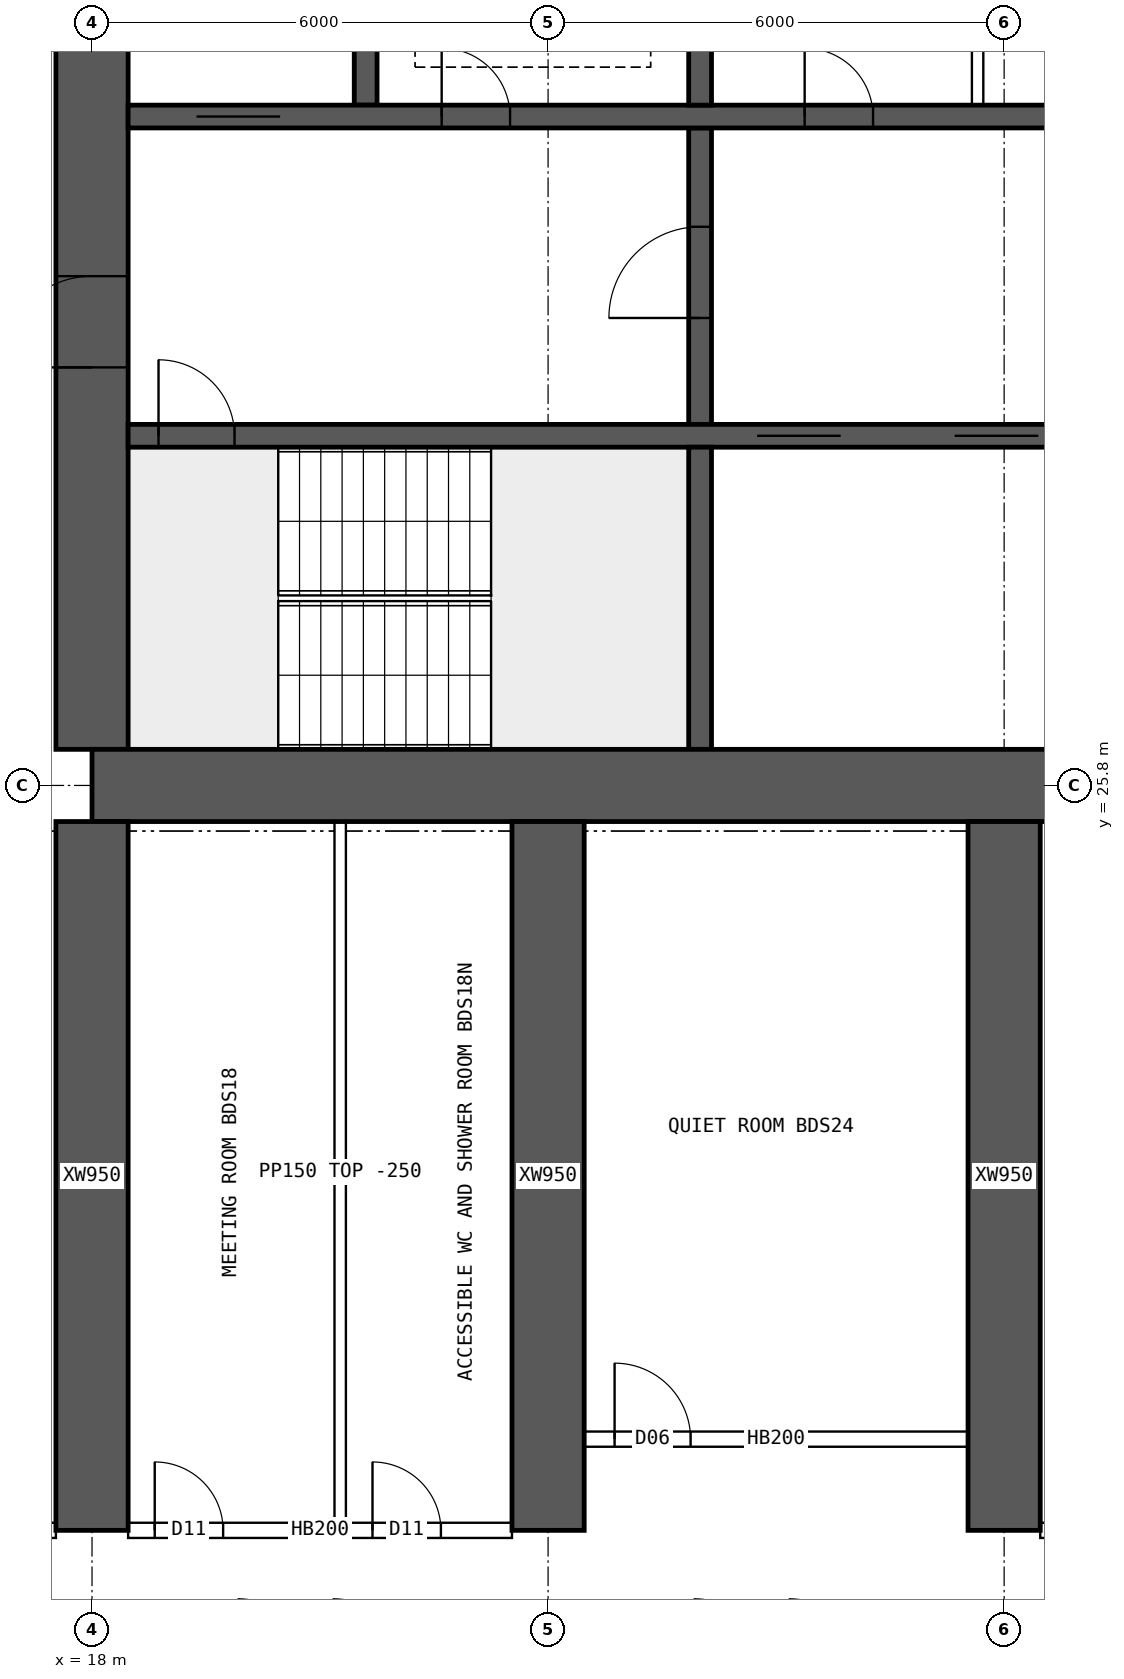
"""IFC4 building model, lengths in metres.
Left out: names, types, materials, properties, quantities, classifications, styles, units other than length and angle.
Written with IfcOpenShell. Run it as: python <this file> out.ifc"""

import sys

from ifc_helpers import new_model, si_unit, direction, frame, frame_2d, origin, place, context, subcontext, project, spatial, rectangle, extrude, element, fill, save


model = new_model("IFC4")
c1 = context("Model", 3, precision=1e-05, world=origin(), true_north=direction((0.0, 1.0)))
c2 = subcontext(c1, "Body", "Model", "MODEL_VIEW")
j1 = project(units=[si_unit("LENGTHUNIT", "METRE"), si_unit("PLANEANGLEUNIT", "RADIAN")], contexts=[c1])
p1 = place(None, origin())
s1 = spatial("IfcSite", under=j1, at=p1, CompositionType="ELEMENT")
p2 = place(p1, origin())
s2 = spatial("IfcBuilding", under=s1, at=p2, CompositionType="ELEMENT")
p3 = place(p2, frame((0.0, 0.0, 88.15)))
s3 = spatial("IfcBuildingStorey", under=s2, at=p3, CompositionType="ELEMENT", Elevation=88.15)
p4 = place(p3, frame((18.0, 25.8, 0.0), z_axis=(0.0, 0.0, 1.0), x_axis=(1.0, 0.0, 0.0)))
e1 = element("IfcWall", 1, at=p4, inside=s3, PredefinedType="SHEAR", context=c2, shape_type="SweptSolid", body=[
    extrude(rectangle(XDim=48.0, YDim=0.95, at=frame_2d((24.0, 0.0))), origin(), (0.0, 0.0, 1.0), 3.75),
])
p5 = place(p3, frame((18.0, 26.275, 0.0), z_axis=(0.0, 0.0, 1.0), x_axis=(0.0, 1.0, 0.0)))
e2 = element("IfcWall", 2, at=p5, inside=s3, PredefinedType="SHEAR", context=c2, shape_type="SweptSolid", body=[
    extrude(rectangle(XDim=11.45, YDim=0.95, at=frame_2d((5.725, 0.0))), origin(), (0.0, 0.0, 1.0), 3.75),
])
p6 = place(p5, frame((5.025, 0.0, 0.0)))
e3 = element("IfcOpeningElement", 3, at=p6, cuts=e2, PredefinedType="OPENING", context=c2, shape_type="SweptSolid", body=[
    extrude(rectangle(XDim=1.2, YDim=2.1, at=frame_2d((0.6, 1.05))), frame((0.0, 0.485, 0.0), z_axis=(0.0, -1.0, 0.0), x_axis=(1.0, 0.0, 0.0)), (0.0, 0.0, 1.0), 0.97),
])
p7 = place(p3, frame((18.475, 30.4, 0.0), z_axis=(0.0, 0.0, 1.0), x_axis=(1.0, 0.0, 0.0)))
e4 = element("IfcWall", 4, at=p7, inside=s3, PredefinedType="SHEAR", context=c2, shape_type="SweptSolid", body=[
    extrude(rectangle(XDim=47.05, YDim=0.3, at=frame_2d((23.525, 0.0))), origin(), (0.0, 0.0, 1.0), 3.75),
])
p8 = place(p7, frame((0.4, 0.0, 0.0)))
e5 = element("IfcOpeningElement", 5, at=p8, cuts=e4, PredefinedType="OPENING", context=c2, shape_type="SweptSolid", body=[
    extrude(rectangle(XDim=1.0, YDim=2.1, at=frame_2d((0.5, 1.05))), frame((0.0, 0.16, 0.0), z_axis=(0.0, -1.0, 0.0), x_axis=(1.0, 0.0, 0.0)), (0.0, 0.0, 1.0), 0.32),
])
p9 = place(p7, frame((45.65, 0.0, 0.0)))
e6 = element("IfcOpeningElement", 6, at=p9, cuts=e4, PredefinedType="OPENING", context=c2, shape_type="SweptSolid", body=[
    extrude(rectangle(XDim=1.0, YDim=2.1, at=frame_2d((0.5, 1.05))), frame((0.0, 0.16, 0.0), z_axis=(0.0, -1.0, 0.0), x_axis=(1.0, 0.0, 0.0)), (0.0, 0.0, 1.0), 0.32),
])
p10 = place(p7, frame((8.275, 0.0, 0.0)))
e7 = element("IfcOpeningElement", 7, at=p10, cuts=e4, PredefinedType="OPENING", context=c2, shape_type="SweptSolid", body=[
    extrude(rectangle(XDim=1.1, YDim=2.1, at=frame_2d((0.55, 1.05))), frame((0.0, 0.16, 0.0), z_axis=(0.0, -1.0, 0.0), x_axis=(1.0, 0.0, 0.0)), (0.0, 0.0, 1.0), 0.32),
])
p11 = place(p7, frame((10.875, 0.0, 0.0)))
e8 = element("IfcOpeningElement", 8, at=p11, cuts=e4, PredefinedType="OPENING", context=c2, shape_type="SweptSolid", body=[
    extrude(rectangle(XDim=1.1, YDim=2.1, at=frame_2d((0.55, 1.05))), frame((0.0, 0.16, 0.0), z_axis=(0.0, -1.0, 0.0), x_axis=(1.0, 0.0, 0.0)), (0.0, 0.0, 1.0), 0.32),
])
p12 = place(p7, frame((13.475, 0.0, 0.0)))
e9 = element("IfcOpeningElement", 9, at=p12, cuts=e4, PredefinedType="OPENING", context=c2, shape_type="SweptSolid", body=[
    extrude(rectangle(XDim=1.1, YDim=2.1, at=frame_2d((0.55, 1.05))), frame((0.0, 0.16, 0.0), z_axis=(0.0, -1.0, 0.0), x_axis=(1.0, 0.0, 0.0)), (0.0, 0.0, 1.0), 0.32),
])
p13 = place(p7, frame((16.075, 0.0, 0.0)))
e10 = element("IfcOpeningElement", 10, at=p13, cuts=e4, PredefinedType="OPENING", context=c2, shape_type="SweptSolid", body=[
    extrude(rectangle(XDim=1.1, YDim=2.1, at=frame_2d((0.55, 1.05))), frame((0.0, 0.16, 0.0), z_axis=(0.0, -1.0, 0.0), x_axis=(1.0, 0.0, 0.0)), (0.0, 0.0, 1.0), 0.32),
])
p14 = place(p7, frame((18.85, 0.0, 0.0)))
e11 = element("IfcOpeningElement", 11, at=p14, cuts=e4, PredefinedType="OPENING", context=c2, shape_type="SweptSolid", body=[
    extrude(rectangle(XDim=0.9, YDim=2.1, at=frame_2d((0.45, 1.05))), frame((0.0, 0.16, 0.0), z_axis=(0.0, -1.0, 0.0), x_axis=(1.0, 0.0, 0.0)), (0.0, 0.0, 1.0), 0.32),
])
p15 = place(p7, frame((30.142, 0.0, 0.0)))
e12 = element("IfcOpeningElement", 12, at=p15, cuts=e4, PredefinedType="OPENING", context=c2, shape_type="SweptSolid", body=[
    extrude(rectangle(XDim=1.1, YDim=2.1, at=frame_2d((0.55, 1.05))), frame((0.0, 0.16, 0.0), z_axis=(0.0, -1.0, 0.0), x_axis=(1.0, 0.0, 0.0)), (0.0, 0.0, 1.0), 0.32),
])
p16 = place(p7, frame((33.675, 0.0, 0.0)))
e13 = element("IfcOpeningElement", 13, at=p16, cuts=e4, PredefinedType="OPENING", context=c2, shape_type="SweptSolid", body=[
    extrude(rectangle(XDim=1.1, YDim=2.1, at=frame_2d((0.55, 1.05))), frame((0.0, 0.16, 0.0), z_axis=(0.0, -1.0, 0.0), x_axis=(1.0, 0.0, 0.0)), (0.0, 0.0, 1.0), 0.32),
])
p17 = place(p7, frame((37.208, 0.0, 0.0)))
e14 = element("IfcOpeningElement", 14, at=p17, cuts=e4, PredefinedType="OPENING", context=c2, shape_type="SweptSolid", body=[
    extrude(rectangle(XDim=1.1, YDim=2.1, at=frame_2d((0.55, 1.05))), frame((0.0, 0.16, 0.0), z_axis=(0.0, -1.0, 0.0), x_axis=(1.0, 0.0, 0.0)), (0.0, 0.0, 1.0), 0.32),
])
p18 = place(p3, frame((18.475, 34.6, 0.0), z_axis=(0.0, 0.0, 1.0), x_axis=(1.0, 0.0, 0.0)))
e15 = element("IfcWall", 15, at=p18, inside=s3, PredefinedType="SHEAR", context=c2, shape_type="SweptSolid", body=[
    extrude(rectangle(XDim=47.05, YDim=0.3, at=frame_2d((23.525, 0.0))), origin(), (0.0, 0.0, 1.0), 3.75),
])
p19 = place(p18, frame((0.9, 0.0, 0.0)))
e16 = element("IfcOpeningElement", 16, at=p19, cuts=e15, PredefinedType="OPENING", context=c2, shape_type="SweptSolid", body=[
    extrude(rectangle(XDim=1.1, YDim=2.1, at=frame_2d((0.55, 1.05))), frame((0.0, 0.16, 0.0), z_axis=(0.0, -1.0, 0.0), x_axis=(1.0, 0.0, 0.0)), (0.0, 0.0, 1.0), 0.32),
])
p20 = place(p18, frame((45.05, 0.0, 0.0)))
e17 = element("IfcOpeningElement", 17, at=p20, cuts=e15, PredefinedType="OPENING", context=c2, shape_type="SweptSolid", body=[
    extrude(rectangle(XDim=1.1, YDim=2.1, at=frame_2d((0.55, 1.05))), frame((0.0, 0.16, 0.0), z_axis=(0.0, -1.0, 0.0), x_axis=(1.0, 0.0, 0.0)), (0.0, 0.0, 1.0), 0.32),
])
p21 = place(p18, frame((4.125, 0.0, 0.0)))
e18 = element("IfcOpeningElement", 18, at=p21, cuts=e15, PredefinedType="OPENING", context=c2, shape_type="SweptSolid", body=[
    extrude(rectangle(XDim=0.9, YDim=2.1, at=frame_2d((0.45, 1.05))), frame((0.0, 0.16, 0.0), z_axis=(0.0, -1.0, 0.0), x_axis=(1.0, 0.0, 0.0)), (0.0, 0.0, 1.0), 0.32),
])
p22 = place(p18, frame((42.025, 0.0, 0.0)))
e19 = element("IfcOpeningElement", 19, at=p22, cuts=e15, PredefinedType="OPENING", context=c2, shape_type="SweptSolid", body=[
    extrude(rectangle(XDim=0.9, YDim=2.1, at=frame_2d((0.45, 1.05))), frame((0.0, 0.16, 0.0), z_axis=(0.0, -1.0, 0.0), x_axis=(1.0, 0.0, 0.0)), (0.0, 0.0, 1.0), 0.32),
])
p23 = place(p18, frame((8.9, 0.0, 0.0)))
e20 = element("IfcOpeningElement", 20, at=p23, cuts=e15, PredefinedType="OPENING", context=c2, shape_type="SweptSolid", body=[
    extrude(rectangle(XDim=0.9, YDim=2.1, at=frame_2d((0.45, 1.05))), frame((0.0, 0.16, 0.0), z_axis=(0.0, -1.0, 0.0), x_axis=(1.0, 0.0, 0.0)), (0.0, 0.0, 1.0), 0.32),
])
p24 = place(p18, frame((12.874, 0.0, 0.0)))
e21 = element("IfcOpeningElement", 21, at=p24, cuts=e15, PredefinedType="OPENING", context=c2, shape_type="SweptSolid", body=[
    extrude(rectangle(XDim=0.9, YDim=2.1, at=frame_2d((0.45, 1.05))), frame((0.0, 0.16, 0.0), z_axis=(0.0, -1.0, 0.0), x_axis=(1.0, 0.0, 0.0)), (0.0, 0.0, 1.0), 0.32),
])
p25 = place(p18, frame((16.521, 0.0, 0.0)))
e22 = element("IfcOpeningElement", 22, at=p25, cuts=e15, PredefinedType="OPENING", context=c2, shape_type="SweptSolid", body=[
    extrude(rectangle(XDim=0.9, YDim=2.1, at=frame_2d((0.45, 1.05))), frame((0.0, 0.16, 0.0), z_axis=(0.0, -1.0, 0.0), x_axis=(1.0, 0.0, 0.0)), (0.0, 0.0, 1.0), 0.32),
])
p26 = place(p18, frame((20.28, 0.0, 0.0)))
e23 = element("IfcOpeningElement", 23, at=p26, cuts=e15, PredefinedType="OPENING", context=c2, shape_type="SweptSolid", body=[
    extrude(rectangle(XDim=0.9, YDim=2.1, at=frame_2d((0.45, 1.05))), frame((0.0, 0.16, 0.0), z_axis=(0.0, -1.0, 0.0), x_axis=(1.0, 0.0, 0.0)), (0.0, 0.0, 1.0), 0.32),
])
p27 = place(p18, frame((24.686, 0.0, 0.0)))
e24 = element("IfcOpeningElement", 24, at=p27, cuts=e15, PredefinedType="OPENING", context=c2, shape_type="SweptSolid", body=[
    extrude(rectangle(XDim=0.9, YDim=2.1, at=frame_2d((0.45, 1.05))), frame((0.0, 0.16, 0.0), z_axis=(0.0, -1.0, 0.0), x_axis=(1.0, 0.0, 0.0)), (0.0, 0.0, 1.0), 0.32),
])
p28 = place(p18, frame((27.483, 0.0, 0.0)))
e25 = element("IfcOpeningElement", 25, at=p28, cuts=e15, PredefinedType="OPENING", context=c2, shape_type="SweptSolid", body=[
    extrude(rectangle(XDim=0.9, YDim=2.1, at=frame_2d((0.45, 1.05))), frame((0.0, 0.16, 0.0), z_axis=(0.0, -1.0, 0.0), x_axis=(1.0, 0.0, 0.0)), (0.0, 0.0, 1.0), 0.32),
])
p29 = place(p18, frame((33.604, 0.0, 0.0)))
e26 = element("IfcOpeningElement", 26, at=p29, cuts=e15, PredefinedType="OPENING", context=c2, shape_type="SweptSolid", body=[
    extrude(rectangle(XDim=0.9, YDim=2.1, at=frame_2d((0.45, 1.05))), frame((0.0, 0.16, 0.0), z_axis=(0.0, -1.0, 0.0), x_axis=(1.0, 0.0, 0.0)), (0.0, 0.0, 1.0), 0.32),
])
p30 = place(p3, frame((26.0, 26.275, 0.0), z_axis=(0.0, 0.0, 1.0), x_axis=(0.0, 1.0, 0.0)))
e27 = element("IfcWall", 27, at=p30, inside=s3, PredefinedType="SHEAR", context=c2, shape_type="SweptSolid", body=[
    extrude(rectangle(XDim=3.975, YDim=0.3, at=frame_2d((1.988, 0.0))), origin(), (0.0, 0.0, 1.0), 3.75),
])
p31 = place(p3, frame((26.0, 30.55, 0.0), z_axis=(0.0, 0.0, 1.0), x_axis=(0.0, 1.0, 0.0)))
e28 = element("IfcWall", 28, at=p31, inside=s3, PredefinedType="SHEAR", context=c2, shape_type="SweptSolid", body=[
    extrude(rectangle(XDim=3.9, YDim=0.3, at=frame_2d((1.95, 0.0))), origin(), (0.0, 0.0, 1.0), 3.75),
])
p32 = place(p31, frame((1.4, 0.0, 0.0)))
e29 = element("IfcOpeningElement", 29, at=p32, cuts=e28, PredefinedType="OPENING", context=c2, shape_type="SweptSolid", body=[
    extrude(rectangle(XDim=1.2, YDim=2.1, at=frame_2d((0.6, 1.05))), frame((0.0, 0.16, 0.0), z_axis=(0.0, -1.0, 0.0), x_axis=(1.0, 0.0, 0.0)), (0.0, 0.0, 1.0), 0.32),
])
for number, where, z_axis, x_axis in (
    (30, (21.6, 34.75, 0.0), (0.0, 0.0, 1.0), (0.0, 1.0, 0.0)),
    (31, (26.0, 34.75, 0.0), (0.0, 0.0, 1.0), (0.0, 1.0, 0.0)),
):
    element("IfcWall", number, at=place(p3, frame(where, z_axis=z_axis, x_axis=x_axis)), inside=s3, PredefinedType="SHEAR", context=c2, shape_type="SweptSolid", body=[
        extrude(rectangle(XDim=2.975, YDim=0.3, at=frame_2d((1.488, 0.0))), origin(), (0.0, 0.0, 1.0), 3.75),
    ])
for number, where, z_axis, x_axis in (
    (32, (18.0, 16.0, 0.0), (0.0, 0.0, 1.0), (0.0, 1.0, 0.0)),
    (33, (24.0, 16.0, 0.0), (0.0, 0.0, 1.0), (0.0, 1.0, 0.0)),
    (34, (30.0, 16.0, 0.0), (0.0, 0.0, 1.0), (0.0, 1.0, 0.0)),
):
    element("IfcWall", number, at=place(p3, frame(where, z_axis=z_axis, x_axis=x_axis)), inside=s3, PredefinedType="SHEAR", context=c2, shape_type="SweptSolid", body=[
        extrude(rectangle(XDim=9.325, YDim=0.95, at=frame_2d((4.663, 0.0))), origin(), (0.0, 0.0, 1.0), 3.75),
    ])
p33 = place(p3, frame((29.651, 34.75, 0.0), z_axis=(0.0, 0.0, 1.0), x_axis=(0.0, 1.0, 0.0)))
e35 = element("IfcWall", 35, at=p33, inside=s3, PredefinedType="SOLIDWALL", context=c2, shape_type="SweptSolid", body=[
    extrude(rectangle(XDim=2.975, YDim=0.15, at=frame_2d((1.488, 0.0))), origin(), (0.0, 0.0, 1.0), 3.5),
])
p34 = place(p3, frame((12.475, 16.0, 0.0), z_axis=(0.0, 0.0, 1.0), x_axis=(1.0, 0.0, 0.0)))
e36 = element("IfcWall", 36, at=p34, inside=s3, PredefinedType="SOLIDWALL", context=c2, shape_type="SweptSolid", body=[
    extrude(rectangle(XDim=5.05, YDim=0.2, at=frame_2d((2.525, 0.0))), origin(), (0.0, 0.0, 1.0), 3.5),
])
p35 = place(p34, frame((3.325, 0.0, 0.0)))
e37 = element("IfcOpeningElement", 37, at=p35, cuts=e36, PredefinedType="OPENING", context=c2, shape_type="SweptSolid", body=[
    extrude(rectangle(XDim=1.6, YDim=2.1, at=frame_2d((0.8, 1.05))), frame((0.0, 0.11, 0.0), z_axis=(0.0, -1.0, 0.0), x_axis=(1.0, 0.0, 0.0)), (0.0, 0.0, 1.0), 0.22),
])
p36 = place(p3, frame((18.475, 16.0, 0.0), z_axis=(0.0, 0.0, 1.0), x_axis=(1.0, 0.0, 0.0)))
e38 = element("IfcWall", 38, at=p36, inside=s3, PredefinedType="SOLIDWALL", context=c2, shape_type="SweptSolid", body=[
    extrude(rectangle(XDim=5.05, YDim=0.2, at=frame_2d((2.525, 0.0))), origin(), (0.0, 0.0, 1.0), 3.5),
])
p37 = place(p36, frame((0.35, 0.0, 0.0)))
e39 = element("IfcOpeningElement", 39, at=p37, cuts=e38, PredefinedType="OPENING", context=c2, shape_type="SweptSolid", body=[
    extrude(rectangle(XDim=0.9, YDim=2.1, at=frame_2d((0.45, 1.05))), frame((0.0, 0.11, 0.0), z_axis=(0.0, -1.0, 0.0), x_axis=(1.0, 0.0, 0.0)), (0.0, 0.0, 1.0), 0.22),
])
p38 = place(p36, frame((3.215, 0.0, 0.0)))
e40 = element("IfcOpeningElement", 40, at=p38, cuts=e38, PredefinedType="OPENING", context=c2, shape_type="SweptSolid", body=[
    extrude(rectangle(XDim=0.9, YDim=2.1, at=frame_2d((0.45, 1.05))), frame((0.0, 0.11, 0.0), z_axis=(0.0, -1.0, 0.0), x_axis=(1.0, 0.0, 0.0)), (0.0, 0.0, 1.0), 0.22),
])
p39 = place(p3, frame((30.475, 16.0, 0.0), z_axis=(0.0, 0.0, 1.0), x_axis=(1.0, 0.0, 0.0)))
e41 = element("IfcWall", 41, at=p39, inside=s3, PredefinedType="SOLIDWALL", context=c2, shape_type="SweptSolid", body=[
    extrude(rectangle(XDim=5.05, YDim=0.2, at=frame_2d((2.525, 0.0))), origin(), (0.0, 0.0, 1.0), 3.5),
])
p40 = place(p39, frame((0.35, 0.0, 0.0)))
e42 = element("IfcOpeningElement", 42, at=p40, cuts=e41, PredefinedType="OPENING", context=c2, shape_type="SweptSolid", body=[
    extrude(rectangle(XDim=0.9, YDim=2.1, at=frame_2d((0.45, 1.05))), frame((0.0, 0.11, 0.0), z_axis=(0.0, -1.0, 0.0), x_axis=(1.0, 0.0, 0.0)), (0.0, 0.0, 1.0), 0.22),
])
p41 = place(p39, frame((2.535, 0.0, 0.0)))
e43 = element("IfcOpeningElement", 43, at=p41, cuts=e41, PredefinedType="OPENING", context=c2, shape_type="SweptSolid", body=[
    extrude(rectangle(XDim=0.9, YDim=2.1, at=frame_2d((0.45, 1.05))), frame((0.0, 0.11, 0.0), z_axis=(0.0, -1.0, 0.0), x_axis=(1.0, 0.0, 0.0)), (0.0, 0.0, 1.0), 0.22),
])
p42 = place(p3, frame((21.265, 16.1, 0.0), z_axis=(0.0, 0.0, 1.0), x_axis=(0.0, 1.0, 0.0)))
e44 = element("IfcWall", 44, at=p42, inside=s3, PredefinedType="PARTITIONING", context=c2, shape_type="SweptSolid", body=[
    extrude(rectangle(XDim=9.225, YDim=0.15, at=frame_2d((4.612, 0.0))), origin(), (0.0, 0.0, 1.0), 3.5),
])
p43 = place(p3, frame((24.475, 17.2, 0.0), z_axis=(0.0, 0.0, 1.0), x_axis=(1.0, 0.0, 0.0)))
e45 = element("IfcWall", 45, at=p43, inside=s3, PredefinedType="SOLIDWALL", context=c2, shape_type="SweptSolid", body=[
    extrude(rectangle(XDim=5.05, YDim=0.2, at=frame_2d((2.525, 0.0))), origin(), (0.0, 0.0, 1.0), 3.5),
])
p44 = place(p43, frame((0.4, 0.0, 0.0)))
e46 = element("IfcOpeningElement", 46, at=p44, cuts=e45, PredefinedType="OPENING", context=c2, shape_type="SweptSolid", body=[
    extrude(rectangle(XDim=1.0, YDim=2.1, at=frame_2d((0.5, 1.05))), frame((0.0, 0.11, 0.0), z_axis=(0.0, -1.0, 0.0), x_axis=(1.0, 0.0, 0.0)), (0.0, 0.0, 1.0), 0.22),
])
p45 = place(p6, origin())
e47 = element("IfcDoor", 47, at=p45, inside=s3, OperationType="SINGLE_SWING_LEFT", PredefinedType="DOOR", context=c2, shape_type="SweptSolid", body=[
    extrude(rectangle(XDim=1.2, YDim=2.1, at=frame_2d((0.6, 1.05))), frame((0.0, 0.025, 0.0), z_axis=(0.0, -1.0, 0.0), x_axis=(1.0, 0.0, 0.0)), (0.0, 0.0, 1.0), 0.05),
])
fill(e3, e47)
p46 = place(p8, origin())
e48 = element("IfcDoor", 48, at=p46, inside=s3, OperationType="SINGLE_SWING_LEFT", PredefinedType="DOOR", context=c2, shape_type="SweptSolid", body=[
    extrude(rectangle(XDim=1.0, YDim=2.1, at=frame_2d((0.5, 1.05))), frame((0.0, 0.025, 0.0), z_axis=(0.0, -1.0, 0.0), x_axis=(1.0, 0.0, 0.0)), (0.0, 0.0, 1.0), 0.05),
])
fill(e5, e48)
p47 = place(p19, origin())
e49 = element("IfcDoor", 49, at=p47, inside=s3, OperationType="DOUBLE_DOOR_SLIDING", PredefinedType="DOOR", context=c2, shape_type="SweptSolid", body=[
    extrude(rectangle(XDim=1.1, YDim=2.1, at=frame_2d((0.55, 1.05))), frame((0.0, 0.025, 0.0), z_axis=(0.0, -1.0, 0.0), x_axis=(1.0, 0.0, 0.0)), (0.0, 0.0, 1.0), 0.05),
])
fill(e16, e49)
p48 = place(p21, origin())
e50 = element("IfcDoor", 50, at=p48, inside=s3, OperationType="SINGLE_SWING_LEFT", PredefinedType="DOOR", context=c2, shape_type="SweptSolid", body=[
    extrude(rectangle(XDim=0.9, YDim=2.1, at=frame_2d((0.45, 1.05))), frame((0.0, 0.025, 0.0), z_axis=(0.0, -1.0, 0.0), x_axis=(1.0, 0.0, 0.0)), (0.0, 0.0, 1.0), 0.05),
])
fill(e18, e50)
p49 = place(p32, origin())
e51 = element("IfcDoor", 51, at=p49, inside=s3, OperationType="SINGLE_SWING_LEFT", PredefinedType="DOOR", context=c2, shape_type="SweptSolid", body=[
    extrude(rectangle(XDim=1.2, YDim=2.1, at=frame_2d((0.6, 1.05))), frame((0.0, 0.025, 0.0), z_axis=(0.0, -1.0, 0.0), x_axis=(1.0, 0.0, 0.0)), (0.0, 0.0, 1.0), 0.05),
])
fill(e29, e51)
p50 = place(p23, origin())
e52 = element("IfcDoor", 52, at=p50, inside=s3, OperationType="SINGLE_SWING_LEFT", PredefinedType="DOOR", context=c2, shape_type="SweptSolid", body=[
    extrude(rectangle(XDim=0.9, YDim=2.1, at=frame_2d((0.45, 1.05))), frame((0.0, 0.025, 0.0), z_axis=(0.0, -1.0, 0.0), x_axis=(1.0, 0.0, 0.0)), (0.0, 0.0, 1.0), 0.05),
])
fill(e20, e52)
p51 = place(p10, origin())
e53 = element("IfcDoor", 53, at=p51, inside=s3, OperationType="DOUBLE_DOOR_SLIDING", PredefinedType="DOOR", context=c2, shape_type="SweptSolid", body=[
    extrude(rectangle(XDim=1.1, YDim=2.1, at=frame_2d((0.55, 1.05))), frame((0.0, 0.025, 0.0), z_axis=(0.0, -1.0, 0.0), x_axis=(1.0, 0.0, 0.0)), (0.0, 0.0, 1.0), 0.05),
])
fill(e7, e53)
p52 = place(p11, origin())
e54 = element("IfcDoor", 54, at=p52, inside=s3, OperationType="DOUBLE_DOOR_SLIDING", PredefinedType="DOOR", context=c2, shape_type="SweptSolid", body=[
    extrude(rectangle(XDim=1.1, YDim=2.1, at=frame_2d((0.55, 1.05))), frame((0.0, 0.025, 0.0), z_axis=(0.0, -1.0, 0.0), x_axis=(1.0, 0.0, 0.0)), (0.0, 0.0, 1.0), 0.05),
])
fill(e8, e54)
p53 = place(p37, origin())
e55 = element("IfcDoor", 55, at=p53, inside=s3, OperationType="SINGLE_SWING_LEFT", PredefinedType="DOOR", context=c2, shape_type="SweptSolid", body=[
    extrude(rectangle(XDim=0.9, YDim=2.1, at=frame_2d((0.45, 1.05))), frame((0.0, 0.025, 0.0), z_axis=(0.0, -1.0, 0.0), x_axis=(1.0, 0.0, 0.0)), (0.0, 0.0, 1.0), 0.05),
])
fill(e39, e55)
p54 = place(p38, origin())
e56 = element("IfcDoor", 56, at=p54, inside=s3, OperationType="SINGLE_SWING_LEFT", PredefinedType="DOOR", context=c2, shape_type="SweptSolid", body=[
    extrude(rectangle(XDim=0.9, YDim=2.1, at=frame_2d((0.45, 1.05))), frame((0.0, 0.025, 0.0), z_axis=(0.0, -1.0, 0.0), x_axis=(1.0, 0.0, 0.0)), (0.0, 0.0, 1.0), 0.05),
])
fill(e40, e56)
p55 = place(p44, origin())
e57 = element("IfcDoor", 57, at=p55, inside=s3, OperationType="SINGLE_SWING_LEFT", PredefinedType="DOOR", context=c2, shape_type="SweptSolid", body=[
    extrude(rectangle(XDim=1.0, YDim=2.1, at=frame_2d((0.5, 1.05))), frame((0.0, 0.025, 0.0), z_axis=(0.0, -1.0, 0.0), x_axis=(1.0, 0.0, 0.0)), (0.0, 0.0, 1.0), 0.05),
])
fill(e46, e57)
save(model, sys.argv[1])
